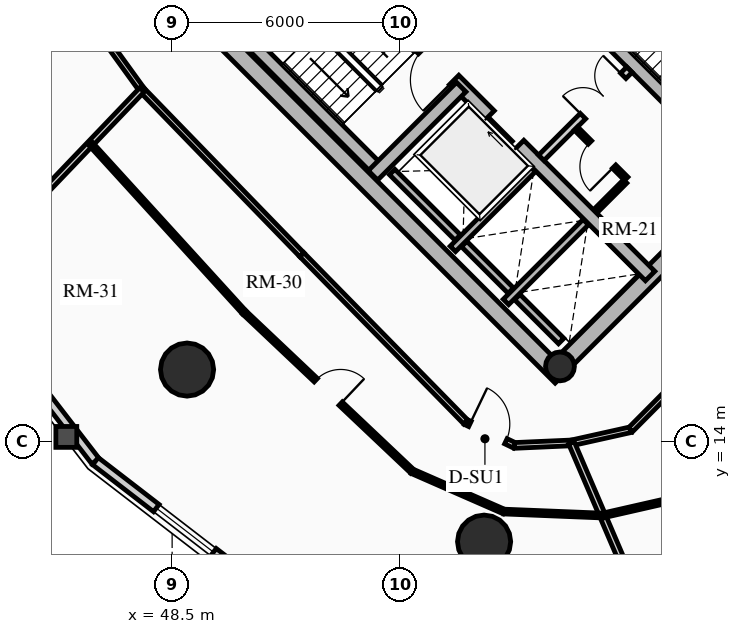
"""IFC4 building model, lengths in metres.
Left out: names, types, materials, properties, quantities, classifications, styles, units other than length and angle.
Written with IfcOpenShell. Run it as: python <this file> out.ifc"""

import sys

from ifc_helpers import new_model, si_unit, direction, frame, frame_2d, origin, origin_2d, place, context, subcontext, project, spatial, rectangle, circle, hollow_circle, extrude, source, transform, mapped, element, fill, save


model = new_model("IFC4")
c1 = context("Model", 3, precision=1e-05, world=origin(), true_north=direction((0.0, 1.0)))
c2 = subcontext(c1, "Body", "Model", "MODEL_VIEW")
j1 = project(units=[si_unit("LENGTHUNIT", "METRE"), si_unit("PLANEANGLEUNIT", "RADIAN")], contexts=[c1])
p1 = place(None, origin())
s1 = spatial("IfcSite", under=j1, at=p1, CompositionType="ELEMENT")
p2 = place(p1, origin())
s2 = spatial("IfcBuilding", under=s1, at=p2, CompositionType="ELEMENT")
p3 = place(p2, frame((0.0, 0.0, 107.98)))
s3 = spatial("IfcBuildingStorey", under=s2, at=p3, CompositionType="ELEMENT", Elevation=107.98)
for number, where, z_axis, x_axis in (
    (1, (58.737, 15.697, 0.0), (0.0, 0.0, 1.0), (-0.707, 0.707, 0.0)),
    (2, (66.303, 23.263, 0.0), (0.0, 0.0, 1.0), (-0.707, 0.707, 0.0)),
):
    element("IfcWall", number, at=place(p3, frame(where, z_axis=z_axis, x_axis=x_axis)), inside=s3, PredefinedType="SHEAR", context=c2, shape_type="SweptSolid", body=[
        extrude(rectangle(XDim=14.2, YDim=0.45, at=frame_2d((7.1, 0.0))), origin(), (0.0, 0.0, 1.0), 2.91),
    ])
p4 = place(p3, frame((58.578, 15.856, 0.0), z_axis=(0.0, 0.0, 1.0), x_axis=(0.707106781187, 0.707106781187, 0.0)))
e3 = element("IfcWall", 3, at=p4, inside=s3, PredefinedType="SHEAR", context=c2, shape_type="SweptSolid", body=[
    extrude(rectangle(XDim=10.7, YDim=0.45, at=frame_2d((5.35, 0.0))), origin(), (0.0, 0.0, 1.0), 2.91),
])
m1 = source(origin(), c2, "Body", "SweptSolid", [
    extrude(rectangle(XDim=1.5, YDim=2.02, at=frame_2d((0.75, 1.01))), frame((0.0, 0.235, 0.0), z_axis=(0.0, -1.0, 0.0), x_axis=(1.0, 0.0, 0.0)), (0.0, 0.0, 1.0), 0.47),
])
p5 = place(p4, frame((5.45, 0.0, 0.0)))
e4 = element("IfcOpeningElement", 4, at=p5, cuts=e3, PredefinedType="OPENING", context=c2, shape_type="MappedRepresentation", body=[
    mapped(m1, transform((0.0, 0.0, 0.0), x_axis=(1.0, 0.0, 0.0), y_axis=(0.0, 1.0, 0.0), z_axis=(0.0, 0.0, 1.0), scale=1.0)),
])
p6 = place(p3, frame((61.078, 18.355, 0.0), z_axis=(0.0, 0.0, 1.0), x_axis=(-0.707106781187, 0.707106781187, 0.0)))
e5 = element("IfcWall", 5, at=p6, inside=s3, PredefinedType="SHEAR", context=c2, shape_type="SweptSolid", body=[
    extrude(rectangle(XDim=13.75, YDim=0.35, at=frame_2d((6.875, 0.0))), origin(), (0.0, 0.0, 1.0), 2.91),
])
m2 = source(origin(), c2, "Body", "SweptSolid", [
    extrude(rectangle(XDim=1.1, YDim=2.015, at=frame_2d((0.55, 1.007))), frame((0.0, 0.185, 0.0), z_axis=(0.0, -1.0, 0.0), x_axis=(1.0, 0.0, 0.0)), (0.0, 0.0, 1.0), 0.37),
])
p7 = place(p6, frame((4.875, 0.0, 0.0)))
e6 = element("IfcOpeningElement", 6, at=p7, cuts=e5, PredefinedType="OPENING", context=c2, shape_type="MappedRepresentation", body=[
    mapped(m2, transform((0.0, 0.0, 0.0), x_axis=(1.0, 0.0, 0.0), y_axis=(0.0, 1.0, 0.0), z_axis=(0.0, 0.0, 1.0), scale=1.0)),
])
m3 = source(origin(), c2, "Body", "SweptSolid", [
    extrude(rectangle(XDim=1.15, YDim=2.02, at=frame_2d((0.575, 1.01))), frame((0.0, 0.185, 0.0), z_axis=(0.0, -1.0, 0.0), x_axis=(1.0, 0.0, 0.0)), (0.0, 0.0, 1.0), 0.37),
])
p8 = place(p6, frame((7.295, 0.0, 0.0)))
e7 = element("IfcOpeningElement", 7, at=p8, cuts=e5, PredefinedType="OPENING", context=c2, shape_type="MappedRepresentation", body=[
    mapped(m3, transform((0.0, 0.0, 0.0), x_axis=(1.0, 0.0, 0.0), y_axis=(0.0, 1.0, 0.0), z_axis=(0.0, 0.0, 1.0), scale=1.0)),
])
p9 = place(p3, frame((63.645, 20.922, 0.0), z_axis=(0.0, 0.0, 1.0), x_axis=(-0.707106781187, 0.707106781187, 0.0)))
e8 = element("IfcWall", 8, at=p9, inside=s3, PredefinedType="SHEAR", context=c2, shape_type="SweptSolid", body=[
    extrude(rectangle(XDim=13.75, YDim=0.35, at=frame_2d((6.875, 0.0))), origin(), (0.0, 0.0, 1.0), 2.91),
])
p10 = place(p9, frame((10.0, 0.0, 0.0)))
e9 = element("IfcOpeningElement", 9, at=p10, cuts=e8, PredefinedType="OPENING", context=c2, shape_type="MappedRepresentation", body=[
    mapped(m2, transform((0.0, 0.0, 0.0), x_axis=(1.0, 0.0, 0.0), y_axis=(0.0, 1.0, 0.0), z_axis=(0.0, 0.0, 1.0), scale=1.0)),
])
p11 = place(p9, frame((12.0, 0.0, 0.0)))
e10 = element("IfcOpeningElement", 10, at=p11, cuts=e8, PredefinedType="OPENING", context=c2, shape_type="MappedRepresentation", body=[
    mapped(m2, transform((0.0, 0.0, 0.0), x_axis=(1.0, 0.0, 0.0), y_axis=(0.0, 1.0, 0.0), z_axis=(0.0, 0.0, 1.0), scale=1.0)),
])
p12 = place(p9, frame((5.305, 0.0, 0.0)))
e11 = element("IfcOpeningElement", 11, at=p12, cuts=e8, PredefinedType="OPENING", context=c2, shape_type="MappedRepresentation", body=[
    mapped(m3, transform((0.0, 0.0, 0.0), x_axis=(1.0, 0.0, 0.0), y_axis=(0.0, 1.0, 0.0), z_axis=(0.0, 0.0, 1.0), scale=1.0)),
])
p13 = place(p3, frame((53.922, 21.141, 0.0), z_axis=(0.0, 0.0, 1.0), x_axis=(-0.707088616009, 0.707124945897, 0.0)))
e12 = element("IfcWall", 12, at=p13, inside=s3, PredefinedType="SHEAR", context=c2, shape_type="SweptSolid", body=[
    extrude(rectangle(XDim=6.72, YDim=0.35, at=frame_2d((3.36, 0.0))), origin(), (0.0, 0.0, 1.0), 2.91),
])
p14 = place(p3, frame((53.784, 21.003, 0.0), z_axis=(0.0, 0.0, 1.0), x_axis=(0.707106781187, 0.707106781187, 0.0)))
e13 = element("IfcWall", 13, at=p14, inside=s3, PredefinedType="SHEAR", context=c2, shape_type="SweptSolid", body=[
    extrude(rectangle(XDim=3.285, YDim=0.35, at=frame_2d((1.643, 0.0))), origin(), (0.0, 0.0, 1.0), 2.91),
])
p15 = place(p3, frame((65.83, 23.107, 0.0), z_axis=(0.0, 0.0, 1.0), x_axis=(-0.707088616009, 0.707124945897, 0.0)))
e14 = element("IfcWall", 14, at=p15, inside=s3, PredefinedType="SHEAR", context=c2, shape_type="SweptSolid", body=[
    extrude(rectangle(XDim=6.72, YDim=0.35, at=frame_2d((3.36, 0.0))), origin(), (0.0, 0.0, 1.0), 2.91),
])
p16 = place(p3, frame((58.706, 15.976, 0.0), z_axis=(0.0, 0.0, 1.0), x_axis=(0.707106781187, 0.707106781187, 0.0)))
e15 = element("IfcColumn", 15, at=p16, inside=s3, PredefinedType="COLUMN", context=c2, shape_type="SweptSolid", body=[
    extrude(hollow_circle(Radius=0.38, WallThickness=0.032, at=origin_2d()), origin(), (0.0, 0.0, 1.0), 2.91),
])
for number, where, z_axis, x_axis in (
    (16, (48.893, 15.893, 0.0), (0.0, 0.0, 1.0), (1.0, 0.0, 0.0)),
    (17, (56.709, 11.365, 0.0), (0.0, 0.0, 1.0), (1.0, 0.0, 0.0)),
):
    element("IfcColumn", number, at=place(p3, frame(where, z_axis=z_axis, x_axis=x_axis)), inside=s3, PredefinedType="USERDEFINED", context=c2, shape_type="SweptSolid", body=[
        extrude(circle(Radius=0.7, at=origin_2d()), origin(), (0.0, 0.0, 1.0), 2.91),
    ])
p17 = place(p3, frame((46.483, 13.483, 0.0), z_axis=(0.0, 0.0, 1.0), x_axis=(-0.61054437102, 0.791982052206, 0.0)))
e18 = element("IfcWall", 18, at=p17, inside=s3, PredefinedType="SOLIDWALL", context=c2, shape_type="SweptSolid", body=[
    extrude(rectangle(XDim=5.942, YDim=0.24, at=frame_2d((2.971, 0.0))), origin(), (0.0, 0.0, 1.0), 2.179),
])
p18 = place(p3, frame((51.189, 9.855, 0.0), z_axis=(0.0, 0.0, 1.0), x_axis=(-0.791982052206, 0.61054437102, 0.0)))
e19 = element("IfcWall", 19, at=p18, inside=s3, PredefinedType="SOLIDWALL", context=c2, shape_type="SweptSolid", body=[
    extrude(rectangle(XDim=5.942, YDim=0.24, at=frame_2d((2.971, 0.0))), origin(), (0.0, 0.0, 1.0), 2.179),
])
m4 = source(origin(), c2, "Body", "SweptSolid", [
    extrude(rectangle(XDim=1.9, YDim=1.35, at=frame_2d((0.95, 0.675))), frame((0.0, 0.13, 0.0), z_axis=(0.0, -1.0, 0.0), x_axis=(1.0, 0.0, 0.0)), (0.0, 0.0, 1.0), 0.26),
])
p19 = place(p18, frame((2.021, 0.0, 0.65)))
e20 = element("IfcOpeningElement", 20, at=p19, cuts=e19, PredefinedType="OPENING", context=c2, shape_type="MappedRepresentation", body=[
    mapped(m4, transform((0.0, 0.0, 0.0), x_axis=(1.0, 0.0, 0.0), y_axis=(0.0, 1.0, 0.0), z_axis=(0.0, 0.0, 1.0), scale=1.0)),
])
p20 = place(p3, frame((55.888, 19.069, 0.0), z_axis=(0.0, 0.0, 1.0), x_axis=(0.707106781187, 0.707106781187, 0.0)))
e21 = element("IfcWall", 21, at=p20, inside=s3, PredefinedType="SHEAR", context=c2, shape_type="SweptSolid", body=[
    extrude(rectangle(XDim=2.97, YDim=0.2, at=frame_2d((1.485, 0.0))), origin(), (0.0, 0.0, 1.0), 2.91),
])
p21 = place(p3, frame((56.015, 19.366, 0.0), z_axis=(0.0, 0.0, 1.0), x_axis=(-0.707106781187, 0.707106781187, 0.0)))
e22 = element("IfcWall", 22, at=p21, inside=s3, PredefinedType="SHEAR", context=c2, shape_type="SweptSolid", body=[
    extrude(rectangle(XDim=2.44, YDim=0.2, at=frame_2d((1.22, 0.0))), origin(), (0.0, 0.0, 1.0), 2.91),
])
p22 = place(p3, frame((57.284, 17.673, 0.0), z_axis=(0.0, 0.0, 1.0), x_axis=(0.707147878904, 0.70706568108, 0.0)))
e23 = element("IfcWall", 23, at=p22, inside=s3, PredefinedType="SHEAR", context=c2, shape_type="SweptSolid", body=[
    extrude(rectangle(XDim=2.97, YDim=0.2, at=frame_2d((1.485, 0.0))), origin(), (0.0, 0.0, 1.0), 2.91),
])
p23 = place(p3, frame((57.412, 17.97, 0.0), z_axis=(0.0, 0.0, 1.0), x_axis=(-0.707106781187, 0.707106781187, 0.0)))
e24 = element("IfcWall", 24, at=p23, inside=s3, PredefinedType="SHEAR", context=c2, shape_type="SweptSolid", body=[
    extrude(rectangle(XDim=1.735, YDim=0.2, at=frame_2d((0.867, 0.0))), origin(), (0.0, 0.0, 1.0), 2.91),
])
p24 = place(p3, frame((58.737, 16.644, 0.0), z_axis=(0.0, 0.0, 1.0), x_axis=(-0.707032117043, 0.707181437447, 0.0)))
e25 = element("IfcWall", 25, at=p24, inside=s3, PredefinedType="SHEAR", context=c2, shape_type="SweptSolid", body=[
    extrude(rectangle(XDim=1.635, YDim=0.2, at=frame_2d((0.817, 0.0))), origin(), (0.0, 0.0, 1.0), 2.91),
])
p25 = place(p3, frame((58.214, 21.467, 0.0), z_axis=(0.0, 0.0, 1.0), x_axis=(0.707106781187, 0.707106781187, 0.0)))
e26 = element("IfcWall", 26, at=p25, inside=s3, PredefinedType="PARTITIONING", context=c2, shape_type="SweptSolid", body=[
    extrude(rectangle(XDim=3.28, YDim=0.2, at=frame_2d((1.64, 0.0))), origin(), (0.0, 0.0, 1.0), 2.655),
])
m5 = source(origin(), c2, "Body", "SweptSolid", [
    extrude(rectangle(XDim=1.5, YDim=2.02, at=frame_2d((0.75, 1.01))), frame((0.0, 0.11, 0.0), z_axis=(0.0, -1.0, 0.0), x_axis=(1.0, 0.0, 0.0)), (0.0, 0.0, 1.0), 0.22),
])
p26 = place(p25, frame((1.55, 0.0, 0.0)))
e27 = element("IfcOpeningElement", 27, at=p26, cuts=e26, PredefinedType="OPENING", context=c2, shape_type="MappedRepresentation", body=[
    mapped(m5, transform((0.0, 0.0, 0.0), x_axis=(1.0, 0.0, 0.0), y_axis=(0.0, 1.0, 0.0), z_axis=(0.0, 0.0, 1.0), scale=1.0)),
])
p27 = place(p3, frame((60.448, 20.915, 0.0), z_axis=(0.0, 0.0, 1.0), x_axis=(-0.707106781187, 0.707106781187, 0.0)))
e28 = element("IfcWall", 28, at=p27, inside=s3, PredefinedType="PARTITIONING", context=c2, shape_type="SweptSolid", body=[
    extrude(rectangle(XDim=1.87, YDim=0.125, at=frame_2d((0.935, 0.0))), origin(), (0.0, 0.0, 1.0), 2.655),
])
m6 = source(origin(), c2, "Body", "SweptSolid", [
    extrude(rectangle(XDim=0.9, YDim=2.005, at=frame_2d((0.45, 1.002))), frame((0.0, 0.073, 0.0), z_axis=(0.0, -1.0, 0.0), x_axis=(1.0, 0.0, 0.0)), (0.0, 0.0, 1.0), 0.145),
])
p28 = place(p27, frame((0.45, 0.0, 0.0)))
e29 = element("IfcOpeningElement", 29, at=p28, cuts=e28, PredefinedType="OPENING", context=c2, shape_type="MappedRepresentation", body=[
    mapped(m6, transform((0.0, 0.0, 0.0), x_axis=(1.0, 0.0, 0.0), y_axis=(0.0, 1.0, 0.0), z_axis=(0.0, 0.0, 1.0), scale=1.0)),
])
p29 = place(p3, frame((59.643, 20.066, 0.0), z_axis=(0.0, 0.0, 1.0), x_axis=(0.707106781187, 0.707106781187, 0.0)))
e30 = element("IfcWall", 30, at=p29, inside=s3, PredefinedType="PARTITIONING", context=c2, shape_type="SweptSolid", body=[
    extrude(rectangle(XDim=1.1, YDim=0.125, at=frame_2d((0.55, 0.0))), origin(), (0.0, 0.0, 1.0), 2.655),
])
p30 = place(p3, frame((46.795, 24.513, 0.0), z_axis=(0.0, 0.0, 1.0), x_axis=(0.585628197524, -0.810579801294, 0.0)))
e31 = element("IfcWall", 31, at=p30, inside=s3, PredefinedType="PARTITIONING", context=c2, shape_type="SweptSolid", body=[
    extrude(rectangle(XDim=1.554, YDim=0.15, at=frame_2d((0.777, 0.0))), origin(), (0.0, 0.0, 1.0), 2.225),
])
p31 = place(p3, frame((47.706, 23.253, 0.0), z_axis=(0.0, 0.0, 1.0), x_axis=(0.696179266346, -0.717867974707, 0.0)))
e32 = element("IfcWall", 32, at=p31, inside=s3, PredefinedType="PARTITIONING", context=c2, shape_type="SweptSolid", body=[
    extrude(rectangle(XDim=6.045, YDim=0.15, at=frame_2d((3.022, 0.0))), origin(), (0.0, 0.0, 1.0), 2.655),
])
p32 = place(p3, frame((51.914, 18.914, 0.0), z_axis=(0.0, 0.0, 1.0), x_axis=(0.699999313799, -0.714143515465, 0.0)))
e33 = element("IfcWall", 33, at=p32, inside=s3, PredefinedType="PARTITIONING", context=c2, shape_type="SweptSolid", body=[
    extrude(rectangle(XDim=6.162, YDim=0.15, at=frame_2d((3.081, 0.0))), origin(), (0.0, 0.0, 1.0), 2.225),
])
p33 = place(p3, frame((56.227, 14.513, 0.0), z_axis=(0.0, 0.0, 1.0), x_axis=(0.901477579283, -0.432825801044, 0.0)))
e34 = element("IfcWall", 34, at=p33, inside=s3, PredefinedType="PARTITIONING", context=c2, shape_type="SweptSolid", body=[
    extrude(rectangle(XDim=1.424, YDim=0.15, at=frame_2d((0.712, 0.0))), origin(), (0.0, 0.0, 1.0), 2.225),
])
m7 = source(origin(), c2, "Body", "SweptSolid", [
    extrude(rectangle(XDim=1.05, YDim=2.015, at=frame_2d((0.525, 1.007))), frame((0.0, 0.085, 0.0), z_axis=(0.0, -1.0, 0.0), x_axis=(1.0, 0.0, 0.0)), (0.0, 0.0, 1.0), 0.17),
])
p34 = place(p33, frame((0.12, 0.0, 0.0)))
e35 = element("IfcOpeningElement", 35, at=p34, cuts=e34, PredefinedType="OPENING", context=c2, shape_type="MappedRepresentation", body=[
    mapped(m7, transform((0.0, 0.0, 0.0), x_axis=(1.0, 0.0, 0.0), y_axis=(0.0, 1.0, 0.0), z_axis=(0.0, 0.0, 1.0), scale=1.0)),
])
p35 = place(p3, frame((57.511, 13.897, 0.0), z_axis=(0.0, 0.0, 1.0), x_axis=(0.999024538494, 0.044158481476, 0.0)))
e36 = element("IfcWall", 36, at=p35, inside=s3, PredefinedType="PARTITIONING", context=c2, shape_type="SweptSolid", body=[
    extrude(rectangle(XDim=1.498, YDim=0.15, at=frame_2d((0.749, 0.0))), origin(), (0.0, 0.0, 1.0), 2.225),
])
p36 = place(p3, frame((59.008, 13.963, 0.0), z_axis=(0.0, 0.0, 1.0), x_axis=(0.976020856791, 0.21767702476, 0.0)))
e37 = element("IfcWall", 37, at=p36, inside=s3, PredefinedType="PARTITIONING", context=c2, shape_type="SweptSolid", body=[
    extrude(rectangle(XDim=1.593, YDim=0.15, at=frame_2d((0.796, 0.0))), origin(), (0.0, 0.0, 1.0), 2.225),
])
p37 = place(p3, frame((60.562, 14.31, 0.0), z_axis=(0.0, 0.0, 1.0), x_axis=(0.704566236161, 0.709638230975, 0.0)))
e38 = element("IfcWall", 38, at=p37, inside=s3, PredefinedType="PARTITIONING", context=c2, shape_type="SweptSolid", body=[
    extrude(rectangle(XDim=3.321, YDim=0.15, at=frame_2d((1.661, 0.0))), origin(), (0.0, 0.0, 1.0), 2.225),
])
p38 = place(p3, frame((47.706, 23.253, 0.0), z_axis=(0.0, 0.0, 1.0), x_axis=(-0.691027649154, -0.722828325472, 0.0)))
e39 = element("IfcWall", 39, at=p38, inside=s3, PredefinedType="PARTITIONING", context=c2, shape_type="SweptSolid", body=[
    extrude(rectangle(XDim=6.994, YDim=0.16, at=frame_2d((3.497, 0.0))), origin(), (0.0, 0.0, 1.0), 2.179),
])
p39 = place(p3, frame((59.008, 13.963, 0.0), z_axis=(0.0, 0.0, 1.0), x_axis=(0.393439207333, -0.919350635032, 0.0)))
e40 = element("IfcWall", 40, at=p39, inside=s3, PredefinedType="PARTITIONING", context=c2, shape_type="SweptSolid", body=[
    extrude(rectangle(XDim=7.427, YDim=0.16, at=frame_2d((3.713, 0.0))), origin(), (0.0, 0.0, 1.0), 2.179),
])
p40 = place(p3, frame((46.352, 21.838, 0.0), z_axis=(0.0, 0.0, 1.0), x_axis=(0.673416949194, -0.739262884594, 0.0)))
e41 = element("IfcWall", 41, at=p40, inside=s3, PredefinedType="PARTITIONING", context=c2, shape_type="SweptSolid", body=[
    extrude(rectangle(XDim=6.007, YDim=0.125, at=frame_2d((3.003, 0.0))), origin(), (0.0, 0.0, 1.0), 2.655),
])
p41 = place(p3, frame((50.397, 17.397, 0.0), z_axis=(0.0, 0.0, 1.0), x_axis=(0.726427828833, -0.687242758781, 0.0)))
e42 = element("IfcWall", 42, at=p41, inside=s3, PredefinedType="PARTITIONING", context=c2, shape_type="SweptSolid", body=[
    extrude(rectangle(XDim=6.087, YDim=0.125, at=frame_2d((3.043, 0.0))), origin(), (0.0, 0.0, 1.0), 2.225),
])
p42 = place(p41, frame((2.594, 0.0, 0.0)))
e43 = element("IfcOpeningElement", 43, at=p42, cuts=e42, PredefinedType="OPENING", context=c2, shape_type="MappedRepresentation", body=[
    mapped(m6, transform((0.0, 0.0, 0.0), x_axis=(1.0, 0.0, 0.0), y_axis=(0.0, 1.0, 0.0), z_axis=(0.0, 0.0, 1.0), scale=1.0)),
])
p43 = place(p3, frame((54.819, 13.214, 0.0), z_axis=(0.0, 0.0, 1.0), x_axis=(0.915889218912, -0.401431113245, 0.0)))
e44 = element("IfcWall", 44, at=p43, inside=s3, PredefinedType="PARTITIONING", context=c2, shape_type="SweptSolid", body=[
    extrude(rectangle(XDim=2.635, YDim=0.125, at=frame_2d((1.318, 0.0))), origin(), (0.0, 0.0, 1.0), 2.225),
])
p44 = place(p3, frame((57.233, 12.156, 0.0), z_axis=(0.0, 0.0, 1.0), x_axis=(0.999181916557, -0.040441286156, 0.0)))
e45 = element("IfcWall", 45, at=p44, inside=s3, PredefinedType="PARTITIONING", context=c2, shape_type="SweptSolid", body=[
    extrude(rectangle(XDim=2.596, YDim=0.125, at=frame_2d((1.298, 0.0))), origin(), (0.0, 0.0, 1.0), 2.655),
])
p45 = place(p3, frame((59.826, 12.051, 0.0), z_axis=(0.0, 0.0, 1.0), x_axis=(0.975009915085, 0.222161350116, 0.0)))
e46 = element("IfcWall", 46, at=p45, inside=s3, PredefinedType="PARTITIONING", context=c2, shape_type="SweptSolid", body=[
    extrude(rectangle(XDim=2.578, YDim=0.125, at=frame_2d((1.289, 0.0))), origin(), (0.0, 0.0, 1.0), 2.225),
])
m8 = source(origin(), c2, "Body", "SweptSolid", [
    extrude(rectangle(XDim=1.9, YDim=1.35, at=frame_2d((0.95, 0.675))), frame((0.0, 0.03, 0.0), z_axis=(0.0, -1.0, 0.0), x_axis=(1.0, 0.0, 0.0)), (0.0, 0.0, 1.0), 0.06),
])
p46 = place(p19, origin())
e47 = element("IfcWindow", 47, at=p46, inside=s3, PartitioningType="DOUBLE_PANEL_VERTICAL", PredefinedType="WINDOW", context=c2, shape_type="MappedRepresentation", body=[
    mapped(m8, transform((0.0, 0.0, 0.0), x_axis=(1.0, 0.0, 0.0), y_axis=(0.0, 1.0, 0.0), z_axis=(0.0, 0.0, 1.0), scale=1.0)),
])
fill(e20, e47)
m9 = source(origin(), c2, "Body", "SweptSolid", [
    extrude(rectangle(XDim=1.1, YDim=2.015, at=frame_2d((0.55, 1.007))), frame((0.0, 0.025, 0.0), z_axis=(0.0, -1.0, 0.0), x_axis=(1.0, 0.0, 0.0)), (0.0, 0.0, 1.0), 0.05),
])
p47 = place(p7, origin())
e48 = element("IfcDoor", 48, at=p47, inside=s3, OperationType="SLIDING_TO_RIGHT", PredefinedType="DOOR", context=c2, shape_type="MappedRepresentation", body=[
    mapped(m9, transform((0.0, 0.0, 0.0), x_axis=(1.0, 0.0, 0.0), y_axis=(0.0, 1.0, 0.0), z_axis=(0.0, 0.0, 1.0), scale=1.0)),
])
fill(e6, e48)
m10 = source(origin(), c2, "Body", "SweptSolid", [
    extrude(rectangle(XDim=1.15, YDim=2.02, at=frame_2d((0.575, 1.01))), frame((0.0, 0.025, 0.0), z_axis=(0.0, -1.0, 0.0), x_axis=(1.0, 0.0, 0.0)), (0.0, 0.0, 1.0), 0.05),
])
p48 = place(p8, origin())
e49 = element("IfcDoor", 49, at=p48, inside=s3, OperationType="SINGLE_SWING_LEFT", PredefinedType="DOOR", context=c2, shape_type="MappedRepresentation", body=[
    mapped(m10, transform((0.0, 0.0, 0.0), x_axis=(1.0, 0.0, 0.0), y_axis=(0.0, 1.0, 0.0), z_axis=(0.0, 0.0, 1.0), scale=1.0)),
])
fill(e7, e49)
m11 = source(origin(), c2, "Body", "SweptSolid", [
    extrude(rectangle(XDim=1.5, YDim=2.02, at=frame_2d((0.75, 1.01))), frame((0.0, 0.025, 0.0), z_axis=(0.0, -1.0, 0.0), x_axis=(1.0, 0.0, 0.0)), (0.0, 0.0, 1.0), 0.05),
])
p49 = place(p26, origin())
e50 = element("IfcDoor", 50, at=p49, inside=s3, OperationType="DOUBLE_DOOR_SINGLE_SWING", PredefinedType="DOOR", context=c2, shape_type="MappedRepresentation", body=[
    mapped(m11, transform((0.0, 0.0, 0.0), x_axis=(1.0, 0.0, 0.0), y_axis=(0.0, 1.0, 0.0), z_axis=(0.0, 0.0, 1.0), scale=1.0)),
])
fill(e27, e50)
m12 = source(origin(), c2, "Body", "SweptSolid", [
    extrude(rectangle(XDim=0.9, YDim=2.005, at=frame_2d((0.45, 1.002))), frame((0.0, 0.025, 0.0), z_axis=(0.0, -1.0, 0.0), x_axis=(1.0, 0.0, 0.0)), (0.0, 0.0, 1.0), 0.05),
])
p50 = place(p28, origin())
e51 = element("IfcDoor", 51, at=p50, inside=s3, OperationType="SINGLE_SWING_LEFT", PredefinedType="DOOR", context=c2, shape_type="MappedRepresentation", body=[
    mapped(m12, transform((0.0, 0.0, 0.0), x_axis=(1.0, 0.0, 0.0), y_axis=(0.0, 1.0, 0.0), z_axis=(0.0, 0.0, 1.0), scale=1.0)),
])
fill(e29, e51)
m13 = source(origin(), c2, "Body", "SweptSolid", [
    extrude(rectangle(XDim=1.05, YDim=2.015, at=frame_2d((0.525, 1.007))), frame((0.0, 0.025, 0.0), z_axis=(0.0, -1.0, 0.0), x_axis=(1.0, 0.0, 0.0)), (0.0, 0.0, 1.0), 0.05),
])
p51 = place(p34, origin())
e52 = element("IfcDoor", 52, at=p51, inside=s3, OperationType="SINGLE_SWING_LEFT", PredefinedType="DOOR", context=c2, shape_type="MappedRepresentation", body=[
    mapped(m13, transform((0.0, 0.0, 0.0), x_axis=(1.0, 0.0, 0.0), y_axis=(0.0, 1.0, 0.0), z_axis=(0.0, 0.0, 1.0), scale=1.0)),
])
fill(e35, e52)
p52 = place(p42, origin())
e53 = element("IfcDoor", 53, at=p52, inside=s3, OperationType="SINGLE_SWING_RIGHT", PredefinedType="DOOR", context=c2, shape_type="MappedRepresentation", body=[
    mapped(m12, transform((0.0, 0.0, 0.0), x_axis=(1.0, 0.0, 0.0), y_axis=(0.0, 1.0, 0.0), z_axis=(0.0, 0.0, 1.0), scale=1.0)),
])
fill(e43, e53)
save(model, sys.argv[1])
